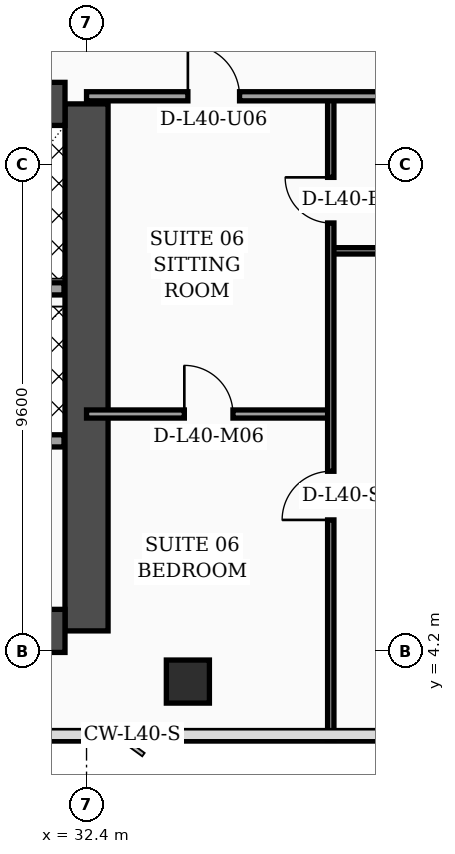
"""IFC4 building model, lengths in metres.
Left out: names, types, materials, properties, quantities, classifications, styles, units other than length and angle.
Written with IfcOpenShell. Run it as: python <this file> out.ifc"""

import sys

from ifc_helpers import new_model, si_unit, direction, frame, frame_2d, origin, origin_2d, place, context, subcontext, project, spatial, rectangle, hollow_rectangle, extrude, element, fill, save


model = new_model("IFC4")
c1 = context("Model", 3, precision=1e-05, world=origin(), true_north=direction((0.0, 1.0)))
c2 = subcontext(c1, "Body", "Model", "MODEL_VIEW")
j1 = project(units=[si_unit("LENGTHUNIT", "METRE"), si_unit("PLANEANGLEUNIT", "RADIAN")], contexts=[c1])
p1 = place(None, origin())
s1 = spatial("IfcSite", under=j1, at=p1, CompositionType="ELEMENT")
p2 = place(p1, origin())
s2 = spatial("IfcBuilding", under=s1, at=p2, CompositionType="ELEMENT")
p3 = place(p2, frame((0.0, 0.0, 163.7)))
s3 = spatial("IfcBuildingStorey", under=s2, at=p3, CompositionType="ELEMENT", Elevation=163.7)
p4 = place(p3, frame((32.4, 4.6, 0.0), z_axis=(0.0, 0.0, 1.0), x_axis=(0.0, 1.0, 0.0)))
e1 = element("IfcWall", 1, at=p4, inside=s3, PredefinedType="SHEAR", context=c2, shape_type="SweptSolid", body=[
    extrude(rectangle(XDim=10.4, YDim=0.85, at=frame_2d((5.2, 0.0))), origin(), (0.0, 0.0, 1.0), 3.56),
])
p5 = place(p3, frame((22.025, 15.0, 0.0), z_axis=(0.0, 0.0, 1.0), x_axis=(1.0, 0.0, 0.0)))
e2 = element("IfcWall", 2, at=p5, inside=s3, PredefinedType="SHEAR", context=c2, shape_type="SweptSolid", body=[
    extrude(rectangle(XDim=9.95, YDim=0.85, at=frame_2d((4.975, 0.0))), origin(), (0.0, 0.0, 1.0), 3.56),
])
p6 = place(p5, frame((4.88, 0.0, 0.0)))
e3 = element("IfcOpeningElement", 3, at=p6, cuts=e2, PredefinedType="OPENING", context=c2, shape_type="SweptSolid", body=[
    extrude(rectangle(XDim=1.1, YDim=2.2, at=frame_2d((0.55, 1.1))), frame((0.0, 0.435, 0.0), z_axis=(0.0, -1.0, 0.0), x_axis=(1.0, 0.0, 0.0)), (0.0, 0.0, 1.0), 0.87),
])
p7 = place(p3, frame((22.025, 4.6, 0.0), z_axis=(0.0, 0.0, 1.0), x_axis=(1.0, 0.0, 0.0)))
e4 = element("IfcWall", 4, at=p7, inside=s3, PredefinedType="SHEAR", context=c2, shape_type="SweptSolid", body=[
    extrude(rectangle(XDim=9.95, YDim=0.85, at=frame_2d((4.975, 0.0))), origin(), (0.0, 0.0, 1.0), 3.56),
])
p8 = place(p3, frame((34.4, 3.6, 0.0), z_axis=(0.0, 0.0, 1.0), x_axis=(1.0, 0.0, 0.0)))
e5 = element("IfcColumn", 5, at=p8, inside=s3, PredefinedType="COLUMN", context=c2, shape_type="SweptSolid", body=[
    extrude(hollow_rectangle(XDim=0.85, YDim=0.85, WallThickness=0.036, at=origin_2d()), origin(), (0.0, 0.0, 1.0), 3.56),
])
p9 = place(p3, frame((27.02, 11.35, 0.0), z_axis=(0.0, 0.0, 1.0), x_axis=(1.0, 0.0, 0.0)))
e6 = element("IfcWall", 6, at=p9, inside=s3, PredefinedType="SOLIDWALL", context=c2, shape_type="SweptSolid", body=[
    extrude(rectangle(XDim=4.935, YDim=0.24, at=frame_2d((2.468, 0.0))), origin(), (0.0, 0.0, 1.0), 3.56),
])
p10 = place(p9, frame((0.45, 0.0, 0.0)))
e7 = element("IfcOpeningElement", 7, at=p10, cuts=e6, PredefinedType="OPENING", context=c2, shape_type="SweptSolid", body=[
    extrude(rectangle(XDim=1.3, YDim=2.35, at=frame_2d((0.65, 1.175))), frame((0.0, 0.13, 0.0), z_axis=(0.0, -1.0, 0.0), x_axis=(1.0, 0.0, 0.0)), (0.0, 0.0, 1.0), 0.26),
])
p11 = place(p3, frame((27.02, 8.35, 0.0), z_axis=(0.0, 0.0, 1.0), x_axis=(1.0, 0.0, 0.0)))
e8 = element("IfcWall", 8, at=p11, inside=s3, PredefinedType="SOLIDWALL", context=c2, shape_type="SweptSolid", body=[
    extrude(rectangle(XDim=4.935, YDim=0.24, at=frame_2d((2.468, 0.0))), origin(), (0.0, 0.0, 1.0), 3.09),
])
p12 = place(p3, frame((37.22, 12.1, 0.0), z_axis=(0.0, 0.0, 1.0), x_axis=(1.0, 0.0, 0.0)))
e9 = element("IfcWall", 9, at=p12, inside=s3, PredefinedType="PARTITIONING", context=c2, shape_type="SweptSolid", body=[
    extrude(rectangle(XDim=1.93, YDim=0.125, at=frame_2d((0.965, 0.0))), origin(), (0.0, 0.0, 1.0), 3.56),
])
p13 = place(p3, frame((32.4, 8.88, 0.0), z_axis=(0.0, 0.0, 1.0), x_axis=(1.0, 0.0, 0.0)))
e10 = element("IfcWall", 10, at=p13, inside=s3, PredefinedType="PARTITIONING", context=c2, shape_type="SweptSolid", body=[
    extrude(rectangle(XDim=4.82, YDim=0.16, at=frame_2d((2.41, 0.0))), origin(), (0.0, 0.0, 1.0), 2.94),
])
p14 = place(p13, frame((1.93, 0.0, 0.0)))
e11 = element("IfcOpeningElement", 11, at=p14, cuts=e10, PredefinedType="OPENING", context=c2, shape_type="SweptSolid", body=[
    extrude(rectangle(XDim=0.96, YDim=2.2, at=frame_2d((0.48, 1.1))), frame((0.0, 0.09, 0.0), z_axis=(0.0, -1.0, 0.0), x_axis=(1.0, 0.0, 0.0)), (0.0, 0.0, 1.0), 0.18),
])
p15 = place(p3, frame((37.22, 2.44, 0.0), z_axis=(0.0, 0.0, 1.0), x_axis=(0.0, 1.0, 0.0)))
e12 = element("IfcWall", 12, at=p15, inside=s3, PredefinedType="PARTITIONING", context=c2, shape_type="SweptSolid", body=[
    extrude(rectangle(XDim=12.71, YDim=0.125, at=frame_2d((6.355, 0.0))), origin(), (0.0, 0.0, 1.0), 2.94),
])
p16 = place(p15, frame((4.35, 0.0, 0.0)))
e13 = element("IfcOpeningElement", 13, at=p16, cuts=e12, PredefinedType="OPENING", context=c2, shape_type="SweptSolid", body=[
    extrude(rectangle(XDim=0.96, YDim=2.2, at=frame_2d((0.48, 1.1))), frame((0.0, 0.073, 0.0), z_axis=(0.0, -1.0, 0.0), x_axis=(1.0, 0.0, 0.0)), (0.0, 0.0, 1.0), 0.145),
])
p17 = place(p15, frame((10.21, 0.0, 0.0)))
e14 = element("IfcOpeningElement", 14, at=p17, cuts=e12, PredefinedType="OPENING", context=c2, shape_type="SweptSolid", body=[
    extrude(rectangle(XDim=0.9, YDim=2.15, at=frame_2d((0.45, 1.075))), frame((0.0, 0.073, 0.0), z_axis=(0.0, -1.0, 0.0), x_axis=(1.0, 0.0, 0.0)), (0.0, 0.0, 1.0), 0.145),
])
p18 = place(p3, frame((32.4, 15.15, 0.0), z_axis=(0.0, 0.0, 1.0), x_axis=(1.0, 0.0, 0.0)))
e15 = element("IfcWall", 15, at=p18, inside=s3, PredefinedType="PARTITIONING", context=c2, shape_type="SweptSolid", body=[
    extrude(rectangle(XDim=13.05, YDim=0.18, at=frame_2d((6.525, 0.0))), origin(), (0.0, 0.0, 1.0), 2.94),
])
p19 = place(p18, frame((2.0, 0.0, 0.0)))
e16 = element("IfcOpeningElement", 16, at=p19, cuts=e15, PredefinedType="OPENING", context=c2, shape_type="SweptSolid", body=[
    extrude(rectangle(XDim=1.02, YDim=2.2, at=frame_2d((0.51, 1.1))), frame((0.0, 0.1, 0.0), z_axis=(0.0, -1.0, 0.0), x_axis=(1.0, 0.0, 0.0)), (0.0, 0.0, 1.0), 0.2),
])
p20 = place(p18, frame((8.43, 0.0, 0.0)))
e17 = element("IfcOpeningElement", 17, at=p20, cuts=e15, PredefinedType="OPENING", context=c2, shape_type="SweptSolid", body=[
    extrude(rectangle(XDim=1.02, YDim=2.2, at=frame_2d((0.51, 1.1))), frame((0.0, 0.1, 0.0), z_axis=(0.0, -1.0, 0.0), x_axis=(1.0, 0.0, 0.0)), (0.0, 0.0, 1.0), 0.2),
])
p21 = place(p14, origin())
e18 = element("IfcDoor", 18, at=p21, inside=s3, OperationType="SINGLE_SWING_LEFT", PredefinedType="DOOR", context=c2, shape_type="SweptSolid", body=[
    extrude(rectangle(XDim=0.96, YDim=2.2, at=frame_2d((0.48, 1.1))), frame((0.0, 0.025, 0.0), z_axis=(0.0, -1.0, 0.0), x_axis=(1.0, 0.0, 0.0)), (0.0, 0.0, 1.0), 0.05),
])
fill(e11, e18)
p22 = place(p16, origin())
e19 = element("IfcDoor", 19, at=p22, inside=s3, OperationType="SINGLE_SWING_LEFT", PredefinedType="DOOR", context=c2, shape_type="SweptSolid", body=[
    extrude(rectangle(XDim=0.96, YDim=2.2, at=frame_2d((0.48, 1.1))), frame((0.0, 0.025, 0.0), z_axis=(0.0, -1.0, 0.0), x_axis=(1.0, 0.0, 0.0)), (0.0, 0.0, 1.0), 0.05),
])
fill(e13, e19)
p23 = place(p17, origin())
e20 = element("IfcDoor", 20, at=p23, inside=s3, OperationType="SINGLE_SWING_RIGHT", PredefinedType="DOOR", context=c2, shape_type="SweptSolid", body=[
    extrude(rectangle(XDim=0.9, YDim=2.15, at=frame_2d((0.45, 1.075))), frame((0.0, 0.025, 0.0), z_axis=(0.0, -1.0, 0.0), x_axis=(1.0, 0.0, 0.0)), (0.0, 0.0, 1.0), 0.05),
])
fill(e14, e20)
p24 = place(p19, origin())
e21 = element("IfcDoor", 21, at=p24, inside=s3, OperationType="SINGLE_SWING_LEFT", PredefinedType="DOOR", context=c2, shape_type="SweptSolid", body=[
    extrude(rectangle(XDim=1.02, YDim=2.2, at=frame_2d((0.51, 1.1))), frame((0.0, 0.025, 0.0), z_axis=(0.0, -1.0, 0.0), x_axis=(1.0, 0.0, 0.0)), (0.0, 0.0, 1.0), 0.05),
])
fill(e16, e21)
save(model, sys.argv[1])
